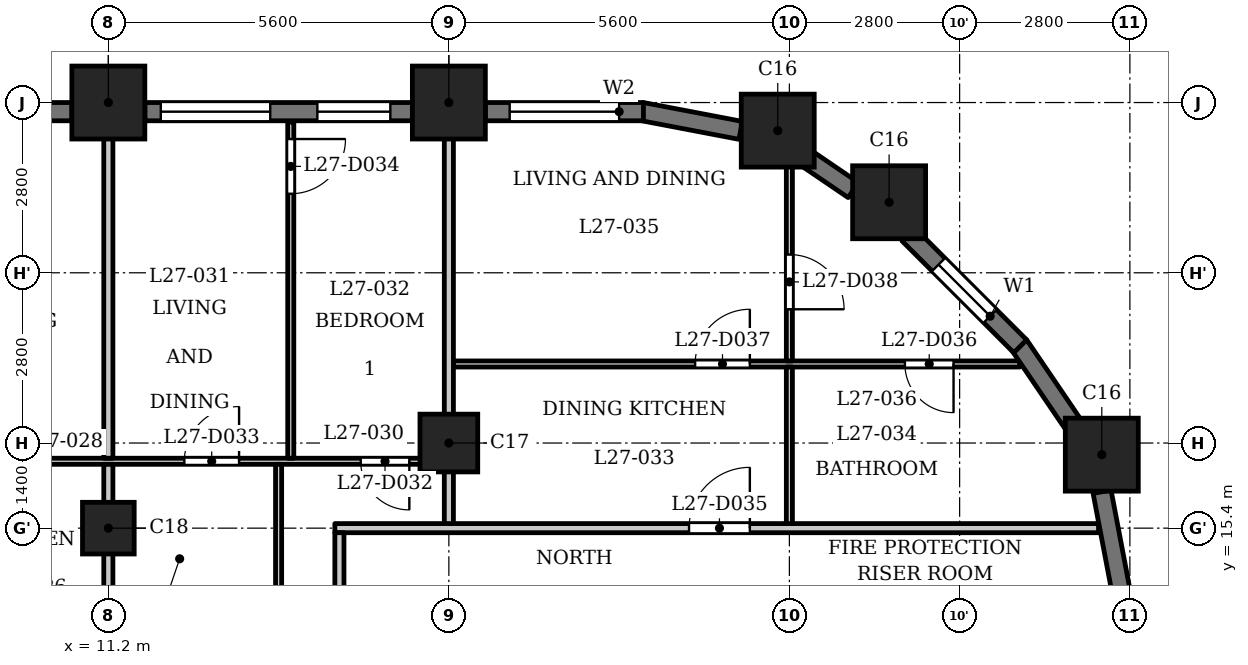
"""IFC4 building model, lengths in metres.
Left out: names, types, materials, properties, quantities, classifications, styles, units other than length and angle.
Written with IfcOpenShell. Run it as: python <this file> out.ifc"""

import sys

from ifc_helpers import new_model, si_unit, direction, frame, frame_2d, origin, origin_2d, place, context, subcontext, project, spatial, rectangle, extrude, element, fill, save


model = new_model("IFC4")
c1 = context("Model", 3, precision=1e-05, world=origin(), true_north=direction((0.0, 1.0)))
c2 = subcontext(c1, "Body", "Model", "MODEL_VIEW")
j1 = project(units=[si_unit("LENGTHUNIT", "METRE"), si_unit("PLANEANGLEUNIT", "RADIAN")], contexts=[c1])
p1 = place(None, origin())
s1 = spatial("IfcSite", under=j1, at=p1, CompositionType="ELEMENT")
p2 = place(p1, origin())
s2 = spatial("IfcBuilding", under=s1, at=p2, CompositionType="ELEMENT")
p3 = place(p2, frame((0.0, 0.0, 107.8)))
s3 = spatial("IfcBuildingStorey", under=s2, at=p3, CompositionType="ELEMENT", Elevation=107.8)
for number, where, z_axis, x_axis in (
    (1, (27.538, 16.609, 0.0), (0.0, 0.0, 1.0), (1.0, 0.0, 0.0)),
    (2, (24.04, 20.76, 0.0), (0.0, 0.0, 1.0), (1.0, 0.0, 0.0)),
    (3, (22.209, 21.938, 0.0), (0.0, 0.0, 1.0), (1.0, 0.0, 0.0)),
    (4, (16.8, 22.4, 0.0), (0.0, 0.0, 1.0), (1.0, 0.0, 0.0)),
    (5, (11.2, 22.4, 0.0), (0.0, 0.0, 1.0), (1.0, 0.0, 0.0)),
):
    element("IfcColumn", number, at=place(p3, frame(where, z_axis=z_axis, x_axis=x_axis)), inside=s3, PredefinedType="COLUMN", context=c2, shape_type="SweptSolid", body=[
        extrude(rectangle(XDim=1.2, YDim=1.2, at=origin_2d()), origin(), (0.0, 0.0, 1.0), 3.5),
    ])
p4 = place(p3, frame((16.8, 16.8, 0.0), z_axis=(0.0, 0.0, 1.0), x_axis=(1.0, 0.0, 0.0)))
e6 = element("IfcColumn", 6, at=p4, inside=s3, PredefinedType="COLUMN", context=c2, shape_type="SweptSolid", body=[
    extrude(rectangle(XDim=0.95, YDim=0.95, at=origin_2d()), origin(), (0.0, 0.0, 1.0), 3.5),
])
p5 = place(p3, frame((11.2, 15.4, 0.0), z_axis=(0.0, 0.0, 1.0), x_axis=(1.0, 0.0, 0.0)))
e7 = element("IfcColumn", 7, at=p5, inside=s3, PredefinedType="COLUMN", context=c2, shape_type="SweptSolid", body=[
    extrude(rectangle(XDim=0.85, YDim=0.85, at=origin_2d()), origin(), (0.0, 0.0, 1.0), 3.5),
])
for number, where, z_axis, x_axis in (
    (8, (27.853, 14.372, 0.0), (0.0, 0.0, 1.0), (-0.187, 0.982, 0.0)),
    (9, (27.11, 17.043, 0.0), (0.0, 0.0, 1.0), (-0.562, 0.827, 0.0)),
):
    element("IfcWall", number, at=place(p3, frame(where, z_axis=z_axis, x_axis=x_axis)), inside=s3, PredefinedType="SOLIDWALL", context=c2, shape_type="SweptSolid", body=[
        extrude(rectangle(XDim=1.656, YDim=0.3, at=frame_2d((0.828, 0.0))), origin(), (0.0, 0.0, 1.0), 2.4),
    ])
p6 = place(p3, frame((26.197, 18.391, 0.0), z_axis=(0.0, 0.0, 1.0), x_axis=(-0.707059830104, 0.707153729152, 0.0)))
e10 = element("IfcWall", 10, at=p6, inside=s3, PredefinedType="SOLIDWALL", context=c2, shape_type="SweptSolid", body=[
    extrude(rectangle(XDim=2.6, YDim=0.3, at=frame_2d((1.3, 0.0))), origin(), (0.0, 0.0, 1.0), 2.4),
])
p7 = place(p6, frame((0.7, 0.0, 0.6)))
e11 = element("IfcOpeningElement", 11, at=p7, cuts=e10, PredefinedType="OPENING", context=c2, shape_type="SweptSolid", body=[
    extrude(rectangle(XDim=1.2, YDim=1.55, at=frame_2d((0.6, 0.775))), frame((0.0, 0.16, 0.0), z_axis=(0.0, -1.0, 0.0), x_axis=(1.0, 0.0, 0.0)), (0.0, 0.0, 1.0), 0.32),
])
p8 = place(p3, frame((23.451, 20.96, 0.0), z_axis=(0.0, 0.0, 1.0), x_axis=(-0.827019434577, 0.562173331661, 0.0)))
e12 = element("IfcWall", 12, at=p8, inside=s3, PredefinedType="SOLIDWALL", context=c2, shape_type="SweptSolid", body=[
    extrude(rectangle(XDim=0.977, YDim=0.3, at=frame_2d((0.489, 0.0))), origin(), (0.0, 0.0, 1.0), 3.2),
])
p9 = place(p3, frame((21.599, 21.942, 0.0), z_axis=(0.0, 0.0, 1.0), x_axis=(-0.98228820662, 0.187376303559, 0.0)))
e13 = element("IfcWall", 13, at=p9, inside=s3, PredefinedType="SOLIDWALL", context=c2, shape_type="SweptSolid", body=[
    extrude(rectangle(XDim=1.656, YDim=0.3, at=frame_2d((0.828, 0.0))), origin(), (0.0, 0.0, 1.0), 2.4),
])
p10 = place(p3, frame((20.0, 22.25, 0.0), z_axis=(0.0, 0.0, 1.0), x_axis=(-1.0, 0.0, 0.0)))
e14 = element("IfcWall", 14, at=p10, inside=s3, PredefinedType="SOLIDWALL", context=c2, shape_type="SweptSolid", body=[
    extrude(rectangle(XDim=2.6, YDim=0.3, at=frame_2d((1.3, 0.0))), origin(), (0.0, 0.0, 1.0), 2.4),
])
p11 = place(p10, frame((0.4, 0.0, 0.9)))
e15 = element("IfcOpeningElement", 15, at=p11, cuts=e14, PredefinedType="OPENING", context=c2, shape_type="SweptSolid", body=[
    extrude(rectangle(XDim=1.8, YDim=1.25, at=frame_2d((0.9, 0.625))), frame((0.0, 0.16, 0.0), z_axis=(0.0, -1.0, 0.0), x_axis=(1.0, 0.0, 0.0)), (0.0, 0.0, 1.0), 0.32),
])
p12 = place(p3, frame((16.2, 22.25, 0.0), z_axis=(0.0, 0.0, 1.0), x_axis=(-1.0, 0.0, 0.0)))
e16 = element("IfcWall", 16, at=p12, inside=s3, PredefinedType="SOLIDWALL", context=c2, shape_type="SweptSolid", body=[
    extrude(rectangle(XDim=4.4, YDim=0.3, at=frame_2d((2.2, 0.0))), origin(), (0.0, 0.0, 1.0), 2.4),
])
p13 = place(p12, frame((0.363, 0.0, 0.6)))
e17 = element("IfcOpeningElement", 17, at=p13, cuts=e16, PredefinedType="OPENING", context=c2, shape_type="SweptSolid", body=[
    extrude(rectangle(XDim=1.2, YDim=1.55, at=frame_2d((0.6, 0.775))), frame((0.0, 0.16, 0.0), z_axis=(0.0, -1.0, 0.0), x_axis=(1.0, 0.0, 0.0)), (0.0, 0.0, 1.0), 0.32),
])
p14 = place(p12, frame((2.337, 0.0, 0.9)))
e18 = element("IfcOpeningElement", 18, at=p14, cuts=e16, PredefinedType="OPENING", context=c2, shape_type="SweptSolid", body=[
    extrude(rectangle(XDim=1.8, YDim=1.25, at=frame_2d((0.9, 0.625))), frame((0.0, 0.16, 0.0), z_axis=(0.0, -1.0, 0.0), x_axis=(1.0, 0.0, 0.0)), (0.0, 0.0, 1.0), 0.32),
])
p15 = place(p3, frame((10.6, 22.25, 0.0), z_axis=(0.0, 0.0, 1.0), x_axis=(-1.0, 0.0, 0.0)))
e19 = element("IfcWall", 19, at=p15, inside=s3, PredefinedType="SOLIDWALL", context=c2, shape_type="SweptSolid", body=[
    extrude(rectangle(XDim=4.4, YDim=0.3, at=frame_2d((2.2, 0.0))), origin(), (0.0, 0.0, 1.0), 2.4),
])
p16 = place(p15, frame((0.4, 0.0, 1.2)))
e20 = element("IfcOpeningElement", 20, at=p16, cuts=e19, PredefinedType="OPENING", context=c2, shape_type="SweptSolid", body=[
    extrude(rectangle(XDim=3.6, YDim=0.95, at=frame_2d((1.8, 0.475))), frame((0.0, 0.16, 0.0), z_axis=(0.0, -1.0, 0.0), x_axis=(1.0, 0.0, 0.0)), (0.0, 0.0, 1.0), 0.32),
])
p17 = place(p3, frame((14.925, 15.4, 0.0), z_axis=(0.0, 0.0, 1.0), x_axis=(1.0, 0.0, 0.0)))
e21 = element("IfcWall", 21, at=p17, inside=s3, PredefinedType="PARTITIONING", context=c2, shape_type="SweptSolid", body=[
    extrude(rectangle(XDim=12.559, YDim=0.15, at=frame_2d((6.279, 0.0))), origin(), (0.0, 0.0, 1.0), 3.2),
])
p18 = place(p17, frame((5.825, 0.0, 0.0)))
e22 = element("IfcOpeningElement", 22, at=p18, cuts=e21, PredefinedType="OPENING", context=c2, shape_type="SweptSolid", body=[
    extrude(rectangle(XDim=1.0, YDim=2.1, at=frame_2d((0.5, 1.05))), frame((0.0, 0.085, 0.0), z_axis=(0.0, -1.0, 0.0), x_axis=(1.0, 0.0, 0.0)), (0.0, 0.0, 1.0), 0.17),
])
p19 = place(p3, frame((-16.725, 16.5, 0.0), z_axis=(0.0, 0.0, 1.0), x_axis=(1.0, 0.0, 0.0)))
e23 = element("IfcWall", 23, at=p19, inside=s3, PredefinedType="PARTITIONING", context=c2, shape_type="SweptSolid", body=[
    extrude(rectangle(XDim=33.45, YDim=0.1, at=frame_2d((16.725, 0.0))), origin(), (0.0, 0.0, 1.0), 3.2),
])
p20 = place(p19, frame((1.075, 0.0, 0.0)))
e24 = element("IfcOpeningElement", 24, at=p20, cuts=e23, PredefinedType="OPENING", context=c2, shape_type="SweptSolid", body=[
    extrude(rectangle(XDim=0.8, YDim=2.1, at=frame_2d((0.4, 1.05))), frame((0.0, 0.06, 0.0), z_axis=(0.0, -1.0, 0.0), x_axis=(1.0, 0.0, 0.0)), (0.0, 0.0, 1.0), 0.12),
])
p21 = place(p19, frame((3.975, 0.0, 0.0)))
e25 = element("IfcOpeningElement", 25, at=p21, cuts=e23, PredefinedType="OPENING", context=c2, shape_type="SweptSolid", body=[
    extrude(rectangle(XDim=0.9, YDim=2.1, at=frame_2d((0.45, 1.05))), frame((0.0, 0.06, 0.0), z_axis=(0.0, -1.0, 0.0), x_axis=(1.0, 0.0, 0.0)), (0.0, 0.0, 1.0), 0.12),
])
p22 = place(p19, frame((8.975, 0.0, 0.0)))
e26 = element("IfcOpeningElement", 26, at=p22, cuts=e23, PredefinedType="OPENING", context=c2, shape_type="SweptSolid", body=[
    extrude(rectangle(XDim=0.8, YDim=2.1, at=frame_2d((0.4, 1.05))), frame((0.0, 0.06, 0.0), z_axis=(0.0, -1.0, 0.0), x_axis=(1.0, 0.0, 0.0)), (0.0, 0.0, 1.0), 0.12),
])
p23 = place(p19, frame((6.325, 0.0, 0.0)))
e27 = element("IfcOpeningElement", 27, at=p23, cuts=e23, PredefinedType="OPENING", context=c2, shape_type="SweptSolid", body=[
    extrude(rectangle(XDim=0.9, YDim=2.1, at=frame_2d((0.45, 1.05))), frame((0.0, 0.06, 0.0), z_axis=(0.0, -1.0, 0.0), x_axis=(1.0, 0.0, 0.0)), (0.0, 0.0, 1.0), 0.12),
])
p24 = place(p19, frame((20.725, 0.0, 0.0)))
e28 = element("IfcOpeningElement", 28, at=p24, cuts=e23, PredefinedType="OPENING", context=c2, shape_type="SweptSolid", body=[
    extrude(rectangle(XDim=0.8, YDim=2.1, at=frame_2d((0.4, 1.05))), frame((0.0, 0.06, 0.0), z_axis=(0.0, -1.0, 0.0), x_axis=(1.0, 0.0, 0.0)), (0.0, 0.0, 1.0), 0.12),
])
p25 = place(p19, frame((17.775, 0.0, 0.0)))
e29 = element("IfcOpeningElement", 29, at=p25, cuts=e23, PredefinedType="OPENING", context=c2, shape_type="SweptSolid", body=[
    extrude(rectangle(XDim=0.9, YDim=2.1, at=frame_2d((0.45, 1.05))), frame((0.0, 0.06, 0.0), z_axis=(0.0, -1.0, 0.0), x_axis=(1.0, 0.0, 0.0)), (0.0, 0.0, 1.0), 0.12),
])
p26 = place(p19, frame((11.825, 0.0, 0.0)))
e30 = element("IfcOpeningElement", 30, at=p26, cuts=e23, PredefinedType="OPENING", context=c2, shape_type="SweptSolid", body=[
    extrude(rectangle(XDim=0.9, YDim=2.1, at=frame_2d((0.45, 1.05))), frame((0.0, 0.06, 0.0), z_axis=(0.0, -1.0, 0.0), x_axis=(1.0, 0.0, 0.0)), (0.0, 0.0, 1.0), 0.12),
])
p27 = place(p19, frame((15.175, 0.0, 0.0)))
e31 = element("IfcOpeningElement", 31, at=p27, cuts=e23, PredefinedType="OPENING", context=c2, shape_type="SweptSolid", body=[
    extrude(rectangle(XDim=0.9, YDim=2.1, at=frame_2d((0.45, 1.05))), frame((0.0, 0.06, 0.0), z_axis=(0.0, -1.0, 0.0), x_axis=(1.0, 0.0, 0.0)), (0.0, 0.0, 1.0), 0.12),
])
p28 = place(p19, frame((22.975, 0.0, 0.0)))
e32 = element("IfcOpeningElement", 32, at=p28, cuts=e23, PredefinedType="OPENING", context=c2, shape_type="SweptSolid", body=[
    extrude(rectangle(XDim=0.8, YDim=2.1, at=frame_2d((0.4, 1.05))), frame((0.0, 0.06, 0.0), z_axis=(0.0, -1.0, 0.0), x_axis=(1.0, 0.0, 0.0)), (0.0, 0.0, 1.0), 0.12),
])
p29 = place(p19, frame((24.875, 0.0, 0.0)))
e33 = element("IfcOpeningElement", 33, at=p29, cuts=e23, PredefinedType="OPENING", context=c2, shape_type="SweptSolid", body=[
    extrude(rectangle(XDim=0.9, YDim=2.1, at=frame_2d((0.45, 1.05))), frame((0.0, 0.06, 0.0), z_axis=(0.0, -1.0, 0.0), x_axis=(1.0, 0.0, 0.0)), (0.0, 0.0, 1.0), 0.12),
])
p30 = place(p19, frame((32.075, 0.0, 0.0)))
e34 = element("IfcOpeningElement", 34, at=p30, cuts=e23, PredefinedType="OPENING", context=c2, shape_type="SweptSolid", body=[
    extrude(rectangle(XDim=0.8, YDim=2.1, at=frame_2d((0.4, 1.05))), frame((0.0, 0.06, 0.0), z_axis=(0.0, -1.0, 0.0), x_axis=(1.0, 0.0, 0.0)), (0.0, 0.0, 1.0), 0.12),
])
p31 = place(p19, frame((29.175, 0.0, 0.0)))
e35 = element("IfcOpeningElement", 35, at=p31, cuts=e23, PredefinedType="OPENING", context=c2, shape_type="SweptSolid", body=[
    extrude(rectangle(XDim=0.9, YDim=2.1, at=frame_2d((0.45, 1.05))), frame((0.0, 0.06, 0.0), z_axis=(0.0, -1.0, 0.0), x_axis=(1.0, 0.0, 0.0)), (0.0, 0.0, 1.0), 0.12),
])
p32 = place(p3, frame((16.875, 18.1, 0.0), z_axis=(0.0, 0.0, 1.0), x_axis=(1.0, 0.0, 0.0)))
e36 = element("IfcWall", 36, at=p32, inside=s3, PredefinedType="PARTITIONING", context=c2, shape_type="SweptSolid", body=[
    extrude(rectangle(XDim=9.315, YDim=0.1, at=frame_2d((4.658, 0.0))), origin(), (0.0, 0.0, 1.0), 3.2),
])
p33 = place(p32, frame((7.425, 0.0, 0.0)))
e37 = element("IfcOpeningElement", 37, at=p33, cuts=e36, PredefinedType="OPENING", context=c2, shape_type="SweptSolid", body=[
    extrude(rectangle(XDim=0.8, YDim=2.1, at=frame_2d((0.4, 1.05))), frame((0.0, 0.06, 0.0), z_axis=(0.0, -1.0, 0.0), x_axis=(1.0, 0.0, 0.0)), (0.0, 0.0, 1.0), 0.12),
])
p34 = place(p32, frame((3.975, 0.0, 0.0)))
e38 = element("IfcOpeningElement", 38, at=p34, cuts=e36, PredefinedType="OPENING", context=c2, shape_type="SweptSolid", body=[
    extrude(rectangle(XDim=0.9, YDim=2.1, at=frame_2d((0.45, 1.05))), frame((0.0, 0.06, 0.0), z_axis=(0.0, -1.0, 0.0), x_axis=(1.0, 0.0, 0.0)), (0.0, 0.0, 1.0), 0.12),
])
p35 = place(p3, frame((11.2, 13.275, 0.0), z_axis=(0.0, 0.0, 1.0), x_axis=(0.0, 1.0, 0.0)))
e39 = element("IfcWall", 39, at=p35, inside=s3, PredefinedType="PARTITIONING", context=c2, shape_type="SweptSolid", body=[
    extrude(rectangle(XDim=3.175, YDim=0.15, at=frame_2d((1.587, 0.0))), origin(), (0.0, 0.0, 1.0), 3.2),
])
p36 = place(p3, frame((11.2, 16.55, 0.0), z_axis=(0.0, 0.0, 1.0), x_axis=(0.0, 1.0, 0.0)))
e40 = element("IfcWall", 40, at=p36, inside=s3, PredefinedType="PARTITIONING", context=c2, shape_type="SweptSolid", body=[
    extrude(rectangle(XDim=6.43, YDim=0.15, at=frame_2d((3.215, 0.0))), origin(), (0.0, 0.0, 1.0), 3.2),
])
p37 = place(p3, frame((14.0, 13.275, 0.0), z_axis=(0.0, 0.0, 1.0), x_axis=(0.0, 1.0, 0.0)))
e41 = element("IfcWall", 41, at=p37, inside=s3, PredefinedType="PARTITIONING", context=c2, shape_type="SweptSolid", body=[
    extrude(rectangle(XDim=3.175, YDim=0.1, at=frame_2d((1.587, 0.0))), origin(), (0.0, 0.0, 1.0), 3.2),
])
p38 = place(p3, frame((14.2, 16.55, 0.0), z_axis=(0.0, 0.0, 1.0), x_axis=(0.0, 1.0, 0.0)))
e42 = element("IfcWall", 42, at=p38, inside=s3, PredefinedType="PARTITIONING", context=c2, shape_type="SweptSolid", body=[
    extrude(rectangle(XDim=5.53, YDim=0.1, at=frame_2d((2.765, 0.0))), origin(), (0.0, 0.0, 1.0), 3.2),
])
p39 = place(p38, frame((4.35, 0.0, 0.0)))
e43 = element("IfcOpeningElement", 43, at=p39, cuts=e42, PredefinedType="OPENING", context=c2, shape_type="SweptSolid", body=[
    extrude(rectangle(XDim=0.9, YDim=2.1, at=frame_2d((0.45, 1.05))), frame((0.0, 0.06, 0.0), z_axis=(0.0, -1.0, 0.0), x_axis=(1.0, 0.0, 0.0)), (0.0, 0.0, 1.0), 0.12),
])
p40 = place(p3, frame((15.0, 13.275, 0.0), z_axis=(0.0, 0.0, 1.0), x_axis=(0.0, 1.0, 0.0)))
e44 = element("IfcWall", 44, at=p40, inside=s3, PredefinedType="PARTITIONING", context=c2, shape_type="SweptSolid", body=[
    extrude(rectangle(XDim=2.05, YDim=0.15, at=frame_2d((1.025, 0.0))), origin(), (0.0, 0.0, 1.0), 3.2),
])
p41 = place(p3, frame((16.8, 15.475, 0.0), z_axis=(0.0, 0.0, 1.0), x_axis=(0.0, 1.0, 0.0)))
e45 = element("IfcWall", 45, at=p41, inside=s3, PredefinedType="PARTITIONING", context=c2, shape_type="SweptSolid", body=[
    extrude(rectangle(XDim=7.505, YDim=0.15, at=frame_2d((3.752, 0.0))), origin(), (0.0, 0.0, 1.0), 3.2),
])
p42 = place(p3, frame((22.4, 15.475, 0.0), z_axis=(0.0, 0.0, 1.0), x_axis=(0.0, 1.0, 0.0)))
e46 = element("IfcWall", 46, at=p42, inside=s3, PredefinedType="PARTITIONING", context=c2, shape_type="SweptSolid", body=[
    extrude(rectangle(XDim=2.575, YDim=0.1, at=frame_2d((1.288, 0.0))), origin(), (0.0, 0.0, 1.0), 3.2),
])
p43 = place(p3, frame((22.4, 18.15, 0.0), z_axis=(0.0, 0.0, 1.0), x_axis=(0.0, 1.0, 0.0)))
e47 = element("IfcWall", 47, at=p43, inside=s3, PredefinedType="PARTITIONING", context=c2, shape_type="SweptSolid", body=[
    extrude(rectangle(XDim=3.57, YDim=0.1, at=frame_2d((1.785, 0.0))), origin(), (0.0, 0.0, 1.0), 3.2),
])
p44 = place(p43, frame((0.85, 0.0, 0.0)))
e48 = element("IfcOpeningElement", 48, at=p44, cuts=e47, PredefinedType="OPENING", context=c2, shape_type="SweptSolid", body=[
    extrude(rectangle(XDim=0.9, YDim=2.1, at=frame_2d((0.45, 1.05))), frame((0.0, 0.06, 0.0), z_axis=(0.0, -1.0, 0.0), x_axis=(1.0, 0.0, 0.0)), (0.0, 0.0, 1.0), 0.12),
])
p45 = place(p30, origin())
e49 = element("IfcDoor", 49, at=p45, inside=s3, OperationType="SINGLE_SWING_RIGHT", PredefinedType="DOOR", context=c2, shape_type="SweptSolid", body=[
    extrude(rectangle(XDim=0.8, YDim=2.1, at=frame_2d((0.4, 1.05))), frame((0.0, 0.025, 0.0), z_axis=(0.0, -1.0, 0.0), x_axis=(1.0, 0.0, 0.0)), (0.0, 0.0, 1.0), 0.05),
])
fill(e34, e49)
p46 = place(p31, origin())
e50 = element("IfcDoor", 50, at=p46, inside=s3, OperationType="SINGLE_SWING_LEFT", PredefinedType="DOOR", context=c2, shape_type="SweptSolid", body=[
    extrude(rectangle(XDim=0.9, YDim=2.1, at=frame_2d((0.45, 1.05))), frame((0.0, 0.025, 0.0), z_axis=(0.0, -1.0, 0.0), x_axis=(1.0, 0.0, 0.0)), (0.0, 0.0, 1.0), 0.05),
])
fill(e35, e50)
p47 = place(p39, origin())
e51 = element("IfcDoor", 51, at=p47, inside=s3, OperationType="SINGLE_SWING_RIGHT", PredefinedType="DOOR", context=c2, shape_type="SweptSolid", body=[
    extrude(rectangle(XDim=0.9, YDim=2.1, at=frame_2d((0.45, 1.05))), frame((0.0, 0.025, 0.0), z_axis=(0.0, -1.0, 0.0), x_axis=(1.0, 0.0, 0.0)), (0.0, 0.0, 1.0), 0.05),
])
fill(e43, e51)
p48 = place(p18, origin())
e52 = element("IfcDoor", 52, at=p48, inside=s3, OperationType="SINGLE_SWING_LEFT", PredefinedType="DOOR", context=c2, shape_type="SweptSolid", body=[
    extrude(rectangle(XDim=1.0, YDim=2.1, at=frame_2d((0.5, 1.05))), frame((0.0, 0.025, 0.0), z_axis=(0.0, -1.0, 0.0), x_axis=(1.0, 0.0, 0.0)), (0.0, 0.0, 1.0), 0.05),
])
fill(e22, e52)
p49 = place(p33, origin())
e53 = element("IfcDoor", 53, at=p49, inside=s3, OperationType="SINGLE_SWING_RIGHT", PredefinedType="DOOR", context=c2, shape_type="SweptSolid", body=[
    extrude(rectangle(XDim=0.8, YDim=2.1, at=frame_2d((0.4, 1.05))), frame((0.0, 0.025, 0.0), z_axis=(0.0, -1.0, 0.0), x_axis=(1.0, 0.0, 0.0)), (0.0, 0.0, 1.0), 0.05),
])
fill(e37, e53)
p50 = place(p34, origin())
e54 = element("IfcDoor", 54, at=p50, inside=s3, OperationType="SINGLE_SWING_LEFT", PredefinedType="DOOR", context=c2, shape_type="SweptSolid", body=[
    extrude(rectangle(XDim=0.9, YDim=2.1, at=frame_2d((0.45, 1.05))), frame((0.0, 0.025, 0.0), z_axis=(0.0, -1.0, 0.0), x_axis=(1.0, 0.0, 0.0)), (0.0, 0.0, 1.0), 0.05),
])
fill(e38, e54)
p51 = place(p44, origin())
e55 = element("IfcDoor", 55, at=p51, inside=s3, OperationType="SINGLE_SWING_LEFT", PredefinedType="DOOR", context=c2, shape_type="SweptSolid", body=[
    extrude(rectangle(XDim=0.9, YDim=2.1, at=frame_2d((0.45, 1.05))), frame((0.0, 0.025, 0.0), z_axis=(0.0, -1.0, 0.0), x_axis=(1.0, 0.0, 0.0)), (0.0, 0.0, 1.0), 0.05),
])
fill(e48, e55)
p52 = place(p7, origin())
e56 = element("IfcWindow", 56, at=p52, inside=s3, PartitioningType="SINGLE_PANEL", PredefinedType="WINDOW", context=c2, shape_type="SweptSolid", body=[
    extrude(rectangle(XDim=1.2, YDim=1.55, at=frame_2d((0.6, 0.775))), frame((0.0, 0.03, 0.0), z_axis=(0.0, -1.0, 0.0), x_axis=(1.0, 0.0, 0.0)), (0.0, 0.0, 1.0), 0.06),
])
fill(e11, e56)
p53 = place(p11, origin())
e57 = element("IfcWindow", 57, at=p53, inside=s3, PartitioningType="SINGLE_PANEL", PredefinedType="WINDOW", context=c2, shape_type="SweptSolid", body=[
    extrude(rectangle(XDim=1.8, YDim=1.25, at=frame_2d((0.9, 0.625))), frame((0.0, 0.03, 0.0), z_axis=(0.0, -1.0, 0.0), x_axis=(1.0, 0.0, 0.0)), (0.0, 0.0, 1.0), 0.06),
])
fill(e15, e57)
p54 = place(p13, origin())
e58 = element("IfcWindow", 58, at=p54, inside=s3, PartitioningType="SINGLE_PANEL", PredefinedType="WINDOW", context=c2, shape_type="SweptSolid", body=[
    extrude(rectangle(XDim=1.2, YDim=1.55, at=frame_2d((0.6, 0.775))), frame((0.0, 0.03, 0.0), z_axis=(0.0, -1.0, 0.0), x_axis=(1.0, 0.0, 0.0)), (0.0, 0.0, 1.0), 0.06),
])
fill(e17, e58)
p55 = place(p14, origin())
e59 = element("IfcWindow", 59, at=p55, inside=s3, PartitioningType="SINGLE_PANEL", PredefinedType="WINDOW", context=c2, shape_type="SweptSolid", body=[
    extrude(rectangle(XDim=1.8, YDim=1.25, at=frame_2d((0.9, 0.625))), frame((0.0, 0.03, 0.0), z_axis=(0.0, -1.0, 0.0), x_axis=(1.0, 0.0, 0.0)), (0.0, 0.0, 1.0), 0.06),
])
fill(e18, e59)
save(model, sys.argv[1])
